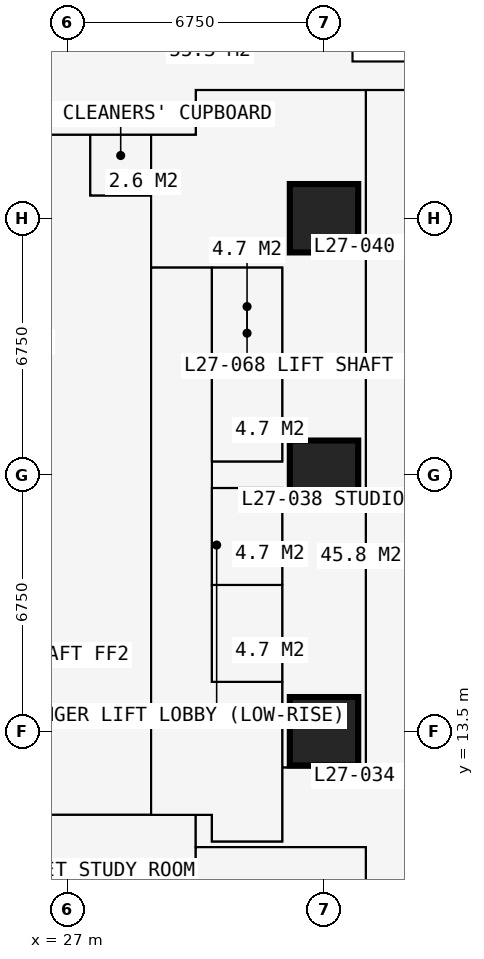
"""IFC4 building model, lengths in metres.
Left out: names, types, materials, properties, quantities, classifications, styles, units other than length and angle.
Written with IfcOpenShell. Run it as: python <this file> out.ifc"""

import sys

from ifc_helpers import new_model, si_unit, direction, frame, frame_2d, origin, origin_2d, place, context, subcontext, project, spatial, rectangle, extrude, element, fill, save


model = new_model("IFC4")
c1 = context("Model", 3, precision=1e-05, world=origin(), true_north=direction((0.0, 1.0)))
c2 = subcontext(c1, "Body", "Model", "MODEL_VIEW")
j1 = project(units=[si_unit("LENGTHUNIT", "METRE"), si_unit("PLANEANGLEUNIT", "RADIAN")], contexts=[c1])
p1 = place(None, origin())
s1 = spatial("IfcSite", under=j1, at=p1, CompositionType="ELEMENT")
p2 = place(p1, origin())
s2 = spatial("IfcBuilding", under=s1, at=p2, CompositionType="ELEMENT")
p3 = place(p2, frame((0.0, 0.0, 101.7)))
s3 = spatial("IfcBuildingStorey", under=s2, at=p3, CompositionType="ELEMENT", Elevation=101.7)
for number, where, z_axis, x_axis in (
    (1, (33.75, 13.5, 0.0), (0.0, 0.0, 1.0), (1.0, 0.0, 0.0)),
    (2, (33.75, 20.25, 0.0), (0.0, 0.0, 1.0), (1.0, 0.0, 0.0)),
    (3, (33.75, 27.0, 0.0), (0.0, 0.0, 1.0), (1.0, 0.0, 0.0)),
):
    element("IfcColumn", number, at=place(p3, frame(where, z_axis=z_axis, x_axis=x_axis)), inside=s3, PredefinedType="COLUMN", context=c2, shape_type="SweptSolid", body=[
        extrude(rectangle(XDim=1.8, YDim=1.8, at=origin_2d()), origin(), (0.0, 0.0, 1.0), 3.6),
    ])
p4 = place(p3, frame((12.9, 13.5, 0.0), z_axis=(0.0, 0.0, 1.0), x_axis=(1.0, 0.0, 0.0)))
e4 = element("IfcWall", 4, at=p4, inside=s3, PredefinedType="SHEAR", context=c2, shape_type="SweptSolid", body=[
    extrude(rectangle(XDim=14.7, YDim=1.2, at=frame_2d((7.35, 0.0))), origin(), (0.0, 0.0, 1.0), 3.6),
])
p5 = place(p3, frame((27.0, 14.1, 0.0), z_axis=(0.0, 0.0, 1.0), x_axis=(0.0, 1.0, 0.0)))
e5 = element("IfcWall", 5, at=p5, inside=s3, PredefinedType="SHEAR", context=c2, shape_type="SweptSolid", body=[
    extrude(rectangle(XDim=12.3, YDim=1.2, at=frame_2d((6.15, 0.0))), origin(), (0.0, 0.0, 1.0), 3.6),
])
p6 = place(p5, frame((3.65, 0.0, 0.0)))
e6 = element("IfcOpeningElement", 6, at=p6, cuts=e5, PredefinedType="OPENING", context=c2, shape_type="SweptSolid", body=[
    extrude(rectangle(XDim=1.2, YDim=2.2, at=frame_2d((0.6, 1.1))), frame((0.0, 0.61, 0.0), z_axis=(0.0, -1.0, 0.0), x_axis=(1.0, 0.0, 0.0)), (0.0, 0.0, 1.0), 1.22),
])
p7 = place(p3, frame((27.6, 27.0, 0.0), z_axis=(0.0, 0.0, 1.0), x_axis=(-1.0, 0.0, 0.0)))
e7 = element("IfcWall", 7, at=p7, inside=s3, PredefinedType="SHEAR", context=c2, shape_type="SweptSolid", body=[
    extrude(rectangle(XDim=14.7, YDim=1.2, at=frame_2d((7.35, 0.0))), origin(), (0.0, 0.0, 1.0), 3.6),
])
p8 = place(p7, frame((5.225, 0.0, 0.0)))
e8 = element("IfcOpeningElement", 8, at=p8, cuts=e7, PredefinedType="OPENING", context=c2, shape_type="SweptSolid", body=[
    extrude(rectangle(XDim=0.9, YDim=2.2, at=frame_2d((0.45, 1.1))), frame((0.0, 0.61, 0.0), z_axis=(0.0, -1.0, 0.0), x_axis=(1.0, 0.0, 0.0)), (0.0, 0.0, 1.0), 1.22),
])
p9 = place(p7, frame((8.2, 0.0, 0.0)))
e9 = element("IfcOpeningElement", 9, at=p9, cuts=e7, PredefinedType="OPENING", context=c2, shape_type="SweptSolid", body=[
    extrude(rectangle(XDim=1.0, YDim=2.2, at=frame_2d((0.5, 1.1))), frame((0.0, 0.61, 0.0), z_axis=(0.0, -1.0, 0.0), x_axis=(1.0, 0.0, 0.0)), (0.0, 0.0, 1.0), 1.22),
])
p10 = place(p3, frame((37.875, 31.125, 0.0), z_axis=(0.0, 0.0, 1.0), x_axis=(-1.0, 0.0, 0.0)))
e10 = element("IfcWall", 10, at=p10, inside=s3, PredefinedType="SOLIDWALL", context=c2, shape_type="SweptSolid", body=[
    extrude(rectangle(XDim=3.375, YDim=0.3, at=frame_2d((1.688, 0.0))), origin(), (0.0, 0.0, 1.0), 3.375),
])
p11 = place(p10, frame((0.788, 0.0, 0.6)))
e11 = element("IfcOpeningElement", 11, at=p11, cuts=e10, PredefinedType="OPENING", context=c2, shape_type="SweptSolid", body=[
    extrude(rectangle(XDim=1.8, YDim=2.1, at=frame_2d((0.9, 1.05))), frame((0.0, 0.16, 0.0), z_axis=(0.0, -1.0, 0.0), x_axis=(1.0, 0.0, 0.0)), (0.0, 0.0, 1.0), 0.32),
])
p12 = place(p3, frame((34.5, 31.125, 0.0), z_axis=(0.0, 0.0, 1.0), x_axis=(0.0, 1.0, 0.0)))
e12 = element("IfcWall", 12, at=p12, inside=s3, PredefinedType="SOLIDWALL", context=c2, shape_type="SweptSolid", body=[
    extrude(rectangle(XDim=3.375, YDim=0.3, at=frame_2d((1.688, 0.0))), origin(), (0.0, 0.0, 1.0), 3.375),
])
p13 = place(p12, frame((0.343, 0.0, 0.9)))
e13 = element("IfcOpeningElement", 13, at=p13, cuts=e12, PredefinedType="OPENING", context=c2, shape_type="SweptSolid", body=[
    extrude(rectangle(XDim=1.2, YDim=1.8, at=frame_2d((0.6, 0.9))), frame((0.0, 0.16, 0.0), z_axis=(0.0, -1.0, 0.0), x_axis=(1.0, 0.0, 0.0)), (0.0, 0.0, 1.0), 0.32),
])
p14 = place(p3, frame((10.125, 11.3, 0.0), z_axis=(0.0, 0.0, 1.0), x_axis=(1.0, 0.0, 0.0)))
e14 = element("IfcWall", 14, at=p14, inside=s3, PredefinedType="PARTITIONING", context=c2, shape_type="SweptSolid", body=[
    extrude(rectangle(XDim=20.675, YDim=0.15, at=frame_2d((10.337, 0.0))), origin(), (0.0, 0.0, 1.0), 3.375),
])
p15 = place(p14, frame((8.375, 0.0, 0.0)))
e15 = element("IfcOpeningElement", 15, at=p15, cuts=e14, PredefinedType="OPENING", context=c2, shape_type="SweptSolid", body=[
    extrude(rectangle(XDim=1.0, YDim=2.2, at=frame_2d((0.5, 1.1))), frame((0.0, 0.085, 0.0), z_axis=(0.0, -1.0, 0.0), x_axis=(1.0, 0.0, 0.0)), (0.0, 0.0, 1.0), 0.17),
])
p16 = place(p14, frame((10.975, 0.0, 0.0)))
e16 = element("IfcOpeningElement", 16, at=p16, cuts=e14, PredefinedType="OPENING", context=c2, shape_type="SweptSolid", body=[
    extrude(rectangle(XDim=1.0, YDim=2.2, at=frame_2d((0.5, 1.1))), frame((0.0, 0.085, 0.0), z_axis=(0.0, -1.0, 0.0), x_axis=(1.0, 0.0, 0.0)), (0.0, 0.0, 1.0), 0.17),
])
p17 = place(p14, frame((3.925, 0.0, 0.0)))
e17 = element("IfcOpeningElement", 17, at=p17, cuts=e14, PredefinedType="OPENING", context=c2, shape_type="SweptSolid", body=[
    extrude(rectangle(XDim=0.95, YDim=2.2, at=frame_2d((0.475, 1.1))), frame((0.0, 0.085, 0.0), z_axis=(0.0, -1.0, 0.0), x_axis=(1.0, 0.0, 0.0)), (0.0, 0.0, 1.0), 0.17),
])
p18 = place(p3, frame((11.3, 29.2, 0.0), z_axis=(0.0, 0.0, 1.0), x_axis=(1.0, 0.0, 0.0)))
e18 = element("IfcWall", 18, at=p18, inside=s3, PredefinedType="PARTITIONING", context=c2, shape_type="SweptSolid", body=[
    extrude(rectangle(XDim=19.075, YDim=0.15, at=frame_2d((9.538, 0.0))), origin(), (0.0, 0.0, 1.0), 3.375),
])
p19 = place(p18, frame((5.825, 0.0, 0.0)))
e19 = element("IfcOpeningElement", 19, at=p19, cuts=e18, PredefinedType="OPENING", context=c2, shape_type="SweptSolid", body=[
    extrude(rectangle(XDim=0.95, YDim=2.2, at=frame_2d((0.475, 1.1))), frame((0.0, 0.085, 0.0), z_axis=(0.0, -1.0, 0.0), x_axis=(1.0, 0.0, 0.0)), (0.0, 0.0, 1.0), 0.17),
])
p20 = place(p18, frame((9.2, 0.0, 0.0)))
e20 = element("IfcOpeningElement", 20, at=p20, cuts=e18, PredefinedType="OPENING", context=c2, shape_type="SweptSolid", body=[
    extrude(rectangle(XDim=0.95, YDim=2.2, at=frame_2d((0.475, 1.1))), frame((0.0, 0.085, 0.0), z_axis=(0.0, -1.0, 0.0), x_axis=(1.0, 0.0, 0.0)), (0.0, 0.0, 1.0), 0.17),
])
p21 = place(p18, frame((0.6, 0.0, 0.0)))
e21 = element("IfcOpeningElement", 21, at=p21, cuts=e18, PredefinedType="OPENING", context=c2, shape_type="SweptSolid", body=[
    extrude(rectangle(XDim=1.0, YDim=2.2, at=frame_2d((0.5, 1.1))), frame((0.0, 0.085, 0.0), z_axis=(0.0, -1.0, 0.0), x_axis=(1.0, 0.0, 0.0)), (0.0, 0.0, 1.0), 0.17),
])
p22 = place(p3, frame((27.6, 27.6, 0.0), z_axis=(0.0, 0.0, 1.0), x_axis=(0.0, 1.0, 0.0)))
e22 = element("IfcWall", 22, at=p22, inside=s3, PredefinedType="PARTITIONING", context=c2, shape_type="SweptSolid", body=[
    extrude(rectangle(XDim=1.6, YDim=0.15, at=frame_2d((0.8, 0.0))), origin(), (0.0, 0.0, 1.0), 3.375),
])
p23 = place(p22, frame((0.3, 0.0, 0.0)))
e23 = element("IfcOpeningElement", 23, at=p23, cuts=e22, PredefinedType="OPENING", context=c2, shape_type="SweptSolid", body=[
    extrude(rectangle(XDim=0.95, YDim=2.2, at=frame_2d((0.475, 1.1))), frame((0.0, 0.085, 0.0), z_axis=(0.0, -1.0, 0.0), x_axis=(1.0, 0.0, 0.0)), (0.0, 0.0, 1.0), 0.17),
])
p24 = place(p3, frame((27.6, 27.6, 0.0), z_axis=(0.0, 0.0, 1.0), x_axis=(1.0, 0.0, 0.0)))
e24 = element("IfcWall", 24, at=p24, inside=s3, PredefinedType="PARTITIONING", context=c2, shape_type="SweptSolid", body=[
    extrude(rectangle(XDim=1.6, YDim=0.15, at=frame_2d((0.8, 0.0))), origin(), (0.0, 0.0, 1.0), 2.806),
])
p25 = place(p3, frame((29.2, 11.3, 0.0), z_axis=(0.0, 0.0, 1.0), x_axis=(0.0, 1.0, 0.0)))
e25 = element("IfcWall", 25, at=p25, inside=s3, PredefinedType="PARTITIONING", context=c2, shape_type="SweptSolid", body=[
    extrude(rectangle(XDim=17.9, YDim=0.2, at=frame_2d((8.95, 0.0))), origin(), (0.0, 0.0, 1.0), 3.375),
])
p26 = place(p25, frame((8.35, 0.0, 0.0)))
e26 = element("IfcOpeningElement", 26, at=p26, cuts=e25, PredefinedType="OPENING", context=c2, shape_type="SweptSolid", body=[
    extrude(rectangle(XDim=1.2, YDim=2.2, at=frame_2d((0.6, 1.1))), frame((0.0, 0.11, 0.0), z_axis=(0.0, -1.0, 0.0), x_axis=(1.0, 0.0, 0.0)), (0.0, 0.0, 1.0), 0.22),
])
p27 = place(p3, frame((29.2, 25.7, 0.0), z_axis=(0.0, 0.0, 1.0), x_axis=(1.0, 0.0, 0.0)))
e27 = element("IfcWall", 27, at=p27, inside=s3, PredefinedType="SHEAR", context=c2, shape_type="SweptSolid", body=[
    extrude(rectangle(XDim=3.45, YDim=0.1, at=frame_2d((1.725, 0.0))), origin(), (0.0, 0.0, 1.0), 3.375),
])
p28 = place(p3, frame((30.375, -0.734, 0.0), z_axis=(0.0, 0.0, 1.0), x_axis=(0.0, 1.0, 0.0)))
e28 = element("IfcWall", 28, at=p28, inside=s3, PredefinedType="PARTITIONING", context=c2, shape_type="SweptSolid", body=[
    extrude(rectangle(XDim=12.034, YDim=0.15, at=frame_2d((6.017, 0.0))), origin(), (0.0, 0.0, 1.0), 3.375),
])
p29 = place(p28, frame((5.134, 0.0, 0.0)))
e29 = element("IfcOpeningElement", 29, at=p29, cuts=e28, PredefinedType="OPENING", context=c2, shape_type="SweptSolid", body=[
    extrude(rectangle(XDim=1.0, YDim=2.2, at=frame_2d((0.5, 1.1))), frame((0.0, 0.085, 0.0), z_axis=(0.0, -1.0, 0.0), x_axis=(1.0, 0.0, 0.0)), (0.0, 0.0, 1.0), 0.17),
])
p30 = place(p3, frame((30.375, 10.45, 0.0), z_axis=(0.0, 0.0, 1.0), x_axis=(1.0, 0.0, 0.0)))
e30 = element("IfcWall", 30, at=p30, inside=s3, PredefinedType="PARTITIONING", context=c2, shape_type="SweptSolid", body=[
    extrude(rectangle(XDim=4.475, YDim=0.15, at=frame_2d((2.238, 0.0))), origin(), (0.0, 0.0, 1.0), 3.375),
])
p31 = place(p30, frame((2.35, 0.0, 0.0)))
e31 = element("IfcOpeningElement", 31, at=p31, cuts=e30, PredefinedType="OPENING", context=c2, shape_type="SweptSolid", body=[
    extrude(rectangle(XDim=0.95, YDim=2.2, at=frame_2d((0.475, 1.1))), frame((0.0, 0.085, 0.0), z_axis=(0.0, -1.0, 0.0), x_axis=(1.0, 0.0, 0.0)), (0.0, 0.0, 1.0), 0.17),
])
p32 = place(p3, frame((30.375, 29.2, 0.0), z_axis=(0.0, 0.0, 1.0), x_axis=(0.0, 1.0, 0.0)))
e32 = element("IfcWall", 32, at=p32, inside=s3, PredefinedType="PARTITIONING", context=c2, shape_type="SweptSolid", body=[
    extrude(rectangle(XDim=1.175, YDim=0.15, at=frame_2d((0.587, 0.0))), origin(), (0.0, 0.0, 1.0), 3.375),
])
p33 = place(p3, frame((30.375, 30.375, 0.0), z_axis=(0.0, 0.0, 1.0), x_axis=(1.0, 0.0, 0.0)))
e33 = element("IfcWall", 33, at=p33, inside=s3, PredefinedType="PARTITIONING", context=c2, shape_type="SweptSolid", body=[
    extrude(rectangle(XDim=7.35, YDim=0.15, at=frame_2d((3.675, 0.0))), origin(), (0.0, 0.0, 1.0), 2.877),
])
p34 = place(p33, frame((5.125, 0.0, 0.0)))
e34 = element("IfcOpeningElement", 34, at=p34, cuts=e33, PredefinedType="OPENING", context=c2, shape_type="SweptSolid", body=[
    extrude(rectangle(XDim=1.0, YDim=2.2, at=frame_2d((0.5, 1.1))), frame((0.0, 0.085, 0.0), z_axis=(0.0, -1.0, 0.0), x_axis=(1.0, 0.0, 0.0)), (0.0, 0.0, 1.0), 0.17),
])
p35 = place(p3, frame((30.8, 10.6, 0.0), z_axis=(0.0, 0.0, 1.0), x_axis=(0.0, 1.0, 0.0)))
e35 = element("IfcWall", 35, at=p35, inside=s3, PredefinedType="PARTITIONING", context=c2, shape_type="SweptSolid", body=[
    extrude(rectangle(XDim=0.7, YDim=0.15, at=frame_2d((0.35, 0.0))), origin(), (0.0, 0.0, 1.0), 3.375),
])
p36 = place(p3, frame((30.8, 10.6, 0.0), z_axis=(0.0, 0.0, 1.0), x_axis=(1.0, 0.0, 0.0)))
e36 = element("IfcWall", 36, at=p36, inside=s3, PredefinedType="PARTITIONING", context=c2, shape_type="SweptSolid", body=[
    extrude(rectangle(XDim=1.85, YDim=0.15, at=frame_2d((0.925, 0.0))), origin(), (0.0, 0.0, 1.0), 3.375),
])
p37 = place(p3, frame((30.8, 14.8, 0.0), z_axis=(0.0, 0.0, 1.0), x_axis=(0.0, 1.0, 0.0)))
e37 = element("IfcWall", 37, at=p37, inside=s3, PredefinedType="PARTITIONING", context=c2, shape_type="SweptSolid", body=[
    extrude(rectangle(XDim=10.9, YDim=0.15, at=frame_2d((5.45, 0.0))), origin(), (0.0, 0.0, 1.0), 3.375),
])
p38 = place(p37, frame((0.75, 0.0, 0.0)))
e38 = element("IfcOpeningElement", 38, at=p38, cuts=e37, PredefinedType="OPENING", context=c2, shape_type="SweptSolid", body=[
    extrude(rectangle(XDim=1.1, YDim=2.2, at=frame_2d((0.55, 1.1))), frame((0.0, 0.085, 0.0), z_axis=(0.0, -1.0, 0.0), x_axis=(1.0, 0.0, 0.0)), (0.0, 0.0, 1.0), 0.17),
])
p39 = place(p37, frame((3.25, 0.0, 0.0)))
e39 = element("IfcOpeningElement", 39, at=p39, cuts=e37, PredefinedType="OPENING", context=c2, shape_type="SweptSolid", body=[
    extrude(rectangle(XDim=1.1, YDim=2.2, at=frame_2d((0.55, 1.1))), frame((0.0, 0.085, 0.0), z_axis=(0.0, -1.0, 0.0), x_axis=(1.0, 0.0, 0.0)), (0.0, 0.0, 1.0), 0.17),
])
p40 = place(p37, frame((6.5, 0.0, 0.0)))
e40 = element("IfcOpeningElement", 40, at=p40, cuts=e37, PredefinedType="OPENING", context=c2, shape_type="SweptSolid", body=[
    extrude(rectangle(XDim=1.1, YDim=2.2, at=frame_2d((0.55, 1.1))), frame((0.0, 0.085, 0.0), z_axis=(0.0, -1.0, 0.0), x_axis=(1.0, 0.0, 0.0)), (0.0, 0.0, 1.0), 0.17),
])
p41 = place(p37, frame((9.05, 0.0, 0.0)))
e41 = element("IfcOpeningElement", 41, at=p41, cuts=e37, PredefinedType="OPENING", context=c2, shape_type="SweptSolid", body=[
    extrude(rectangle(XDim=1.1, YDim=2.2, at=frame_2d((0.55, 1.1))), frame((0.0, 0.085, 0.0), z_axis=(0.0, -1.0, 0.0), x_axis=(1.0, 0.0, 0.0)), (0.0, 0.0, 1.0), 0.17),
])
for number, where, z_axis, x_axis in (
    (42, (30.8, 14.8, 0.0), (0.0, 0.0, 1.0), (1.0, 0.0, 0.0)),
    (43, (30.8, 17.35, 0.0), (0.0, 0.0, 1.0), (1.0, 0.0, 0.0)),
    (44, (30.8, 19.9, 0.0), (0.0, 0.0, 1.0), (1.0, 0.0, 0.0)),
    (45, (30.8, 20.6, 0.0), (0.0, 0.0, 1.0), (1.0, 0.0, 0.0)),
    (46, (30.8, 23.15, 0.0), (0.0, 0.0, 1.0), (1.0, 0.0, 0.0)),
):
    element("IfcWall", number, at=place(p3, frame(where, z_axis=z_axis, x_axis=x_axis)), inside=s3, PredefinedType="SHEAR", context=c2, shape_type="SweptSolid", body=[
        extrude(rectangle(XDim=1.85, YDim=0.1, at=frame_2d((0.925, 0.0))), origin(), (0.0, 0.0, 1.0), 3.375),
    ])
p42 = place(p3, frame((32.65, 10.6, 0.0), z_axis=(0.0, 0.0, 1.0), x_axis=(0.0, 1.0, 0.0)))
e47 = element("IfcWall", 47, at=p42, inside=s3, PredefinedType="SHEAR", context=c2, shape_type="SweptSolid", body=[
    extrude(rectangle(XDim=9.3, YDim=0.1, at=frame_2d((4.65, 0.0))), origin(), (0.0, 0.0, 1.0), 3.375),
])
p43 = place(p42, frame((0.5, 0.0, 0.0)))
e48 = element("IfcOpeningElement", 48, at=p43, cuts=e47, PredefinedType="OPENING", context=c2, shape_type="SweptSolid", body=[
    extrude(rectangle(XDim=1.0, YDim=2.2, at=frame_2d((0.5, 1.1))), frame((0.0, 0.06, 0.0), z_axis=(0.0, -1.0, 0.0), x_axis=(1.0, 0.0, 0.0)), (0.0, 0.0, 1.0), 0.12),
])
p44 = place(p3, frame((32.65, 12.55, 0.0), z_axis=(0.0, 0.0, 1.0), x_axis=(1.0, 0.0, 0.0)))
e49 = element("IfcWall", 49, at=p44, inside=s3, PredefinedType="PARTITIONING", context=c2, shape_type="SweptSolid", body=[
    extrude(rectangle(XDim=2.2, YDim=0.15, at=frame_2d((1.1, 0.0))), origin(), (0.0, 0.0, 1.0), 3.375),
])
p45 = place(p3, frame((32.65, 20.6, 0.0), z_axis=(0.0, 0.0, 1.0), x_axis=(0.0, 1.0, 0.0)))
e50 = element("IfcWall", 50, at=p45, inside=s3, PredefinedType="PARTITIONING", context=c2, shape_type="SweptSolid", body=[
    extrude(rectangle(XDim=5.1, YDim=0.15, at=frame_2d((2.55, 0.0))), origin(), (0.0, 0.0, 1.0), 3.375),
])
p46 = place(p3, frame((34.85, 6.75, 0.0), z_axis=(0.0, 0.0, 1.0), x_axis=(0.0, 1.0, 0.0)))
e51 = element("IfcWall", 51, at=p46, inside=s3, PredefinedType="PARTITIONING", context=c2, shape_type="SweptSolid", body=[
    extrude(rectangle(XDim=3.7, YDim=0.15, at=frame_2d((1.85, 0.0))), origin(), (0.0, 0.0, 1.0), 3.375),
])
p47 = place(p3, frame((34.85, 12.55, 0.0), z_axis=(0.0, 0.0, 1.0), x_axis=(0.0, 1.0, 0.0)))
e52 = element("IfcWall", 52, at=p47, inside=s3, PredefinedType="PARTITIONING", context=c2, shape_type="SweptSolid", body=[
    extrude(rectangle(XDim=17.825, YDim=0.15, at=frame_2d((8.913, 0.0))), origin(), (0.0, 0.0, 1.0), 3.375),
])
p48 = place(p47, frame((8.6, 0.0, 0.0)))
e53 = element("IfcOpeningElement", 53, at=p48, cuts=e52, PredefinedType="OPENING", context=c2, shape_type="SweptSolid", body=[
    extrude(rectangle(XDim=0.95, YDim=2.2, at=frame_2d((0.475, 1.1))), frame((0.0, 0.085, 0.0), z_axis=(0.0, -1.0, 0.0), x_axis=(1.0, 0.0, 0.0)), (0.0, 0.0, 1.0), 0.17),
])
p49 = place(p11, origin())
e54 = element("IfcWindow", 54, at=p49, inside=s3, PartitioningType="SINGLE_PANEL", PredefinedType="WINDOW", context=c2, shape_type="SweptSolid", body=[
    extrude(rectangle(XDim=1.8, YDim=2.1, at=frame_2d((0.9, 1.05))), frame((0.0, 0.03, 0.0), z_axis=(0.0, -1.0, 0.0), x_axis=(1.0, 0.0, 0.0)), (0.0, 0.0, 1.0), 0.06),
])
fill(e11, e54)
p50 = place(p6, origin())
e55 = element("IfcDoor", 55, at=p50, inside=s3, OperationType="DOUBLE_DOOR_SINGLE_SWING", PredefinedType="DOOR", context=c2, shape_type="SweptSolid", body=[
    extrude(rectangle(XDim=1.2, YDim=2.2, at=frame_2d((0.6, 1.1))), frame((0.0, 0.025, 0.0), z_axis=(0.0, -1.0, 0.0), x_axis=(1.0, 0.0, 0.0)), (0.0, 0.0, 1.0), 0.05),
])
fill(e6, e55)
p51 = place(p23, origin())
e56 = element("IfcDoor", 56, at=p51, inside=s3, OperationType="SINGLE_SWING_LEFT", PredefinedType="DOOR", context=c2, shape_type="SweptSolid", body=[
    extrude(rectangle(XDim=0.95, YDim=2.2, at=frame_2d((0.475, 1.1))), frame((0.0, 0.025, 0.0), z_axis=(0.0, -1.0, 0.0), x_axis=(1.0, 0.0, 0.0)), (0.0, 0.0, 1.0), 0.05),
])
fill(e23, e56)
p52 = place(p43, origin())
e57 = element("IfcDoor", 57, at=p52, inside=s3, OperationType="SINGLE_SWING_LEFT", PredefinedType="DOOR", context=c2, shape_type="SweptSolid", body=[
    extrude(rectangle(XDim=1.0, YDim=2.2, at=frame_2d((0.5, 1.1))), frame((0.0, 0.025, 0.0), z_axis=(0.0, -1.0, 0.0), x_axis=(1.0, 0.0, 0.0)), (0.0, 0.0, 1.0), 0.05),
])
fill(e48, e57)
p53 = place(p48, origin())
e58 = element("IfcDoor", 58, at=p53, inside=s3, OperationType="SINGLE_SWING_LEFT", PredefinedType="DOOR", context=c2, shape_type="SweptSolid", body=[
    extrude(rectangle(XDim=0.95, YDim=2.2, at=frame_2d((0.475, 1.1))), frame((0.0, 0.025, 0.0), z_axis=(0.0, -1.0, 0.0), x_axis=(1.0, 0.0, 0.0)), (0.0, 0.0, 1.0), 0.05),
])
fill(e53, e58)
p54 = place(p31, origin())
e59 = element("IfcDoor", 59, at=p54, inside=s3, OperationType="SINGLE_SWING_LEFT", PredefinedType="DOOR", context=c2, shape_type="SweptSolid", body=[
    extrude(rectangle(XDim=0.95, YDim=2.2, at=frame_2d((0.475, 1.1))), frame((0.0, 0.025, 0.0), z_axis=(0.0, -1.0, 0.0), x_axis=(1.0, 0.0, 0.0)), (0.0, 0.0, 1.0), 0.05),
])
fill(e31, e59)
p55 = place(p34, origin())
e60 = element("IfcDoor", 60, at=p55, inside=s3, OperationType="SINGLE_SWING_LEFT", PredefinedType="DOOR", context=c2, shape_type="SweptSolid", body=[
    extrude(rectangle(XDim=1.0, YDim=2.2, at=frame_2d((0.5, 1.1))), frame((0.0, 0.025, 0.0), z_axis=(0.0, -1.0, 0.0), x_axis=(1.0, 0.0, 0.0)), (0.0, 0.0, 1.0), 0.05),
])
fill(e34, e60)
p56 = place(p38, origin())
e61 = element("IfcDoor", 61, at=p56, inside=s3, OperationType="DOUBLE_DOOR_SLIDING", PredefinedType="DOOR", context=c2, shape_type="SweptSolid", body=[
    extrude(rectangle(XDim=1.1, YDim=2.2, at=frame_2d((0.55, 1.1))), frame((0.0, 0.025, 0.0), z_axis=(0.0, -1.0, 0.0), x_axis=(1.0, 0.0, 0.0)), (0.0, 0.0, 1.0), 0.05),
])
fill(e38, e61)
p57 = place(p39, origin())
e62 = element("IfcDoor", 62, at=p57, inside=s3, OperationType="DOUBLE_DOOR_SLIDING", PredefinedType="DOOR", context=c2, shape_type="SweptSolid", body=[
    extrude(rectangle(XDim=1.1, YDim=2.2, at=frame_2d((0.55, 1.1))), frame((0.0, 0.025, 0.0), z_axis=(0.0, -1.0, 0.0), x_axis=(1.0, 0.0, 0.0)), (0.0, 0.0, 1.0), 0.05),
])
fill(e39, e62)
p58 = place(p40, origin())
e63 = element("IfcDoor", 63, at=p58, inside=s3, OperationType="DOUBLE_DOOR_SLIDING", PredefinedType="DOOR", context=c2, shape_type="SweptSolid", body=[
    extrude(rectangle(XDim=1.1, YDim=2.2, at=frame_2d((0.55, 1.1))), frame((0.0, 0.025, 0.0), z_axis=(0.0, -1.0, 0.0), x_axis=(1.0, 0.0, 0.0)), (0.0, 0.0, 1.0), 0.05),
])
fill(e40, e63)
p59 = place(p41, origin())
e64 = element("IfcDoor", 64, at=p59, inside=s3, OperationType="DOUBLE_DOOR_SLIDING", PredefinedType="DOOR", context=c2, shape_type="SweptSolid", body=[
    extrude(rectangle(XDim=1.1, YDim=2.2, at=frame_2d((0.55, 1.1))), frame((0.0, 0.025, 0.0), z_axis=(0.0, -1.0, 0.0), x_axis=(1.0, 0.0, 0.0)), (0.0, 0.0, 1.0), 0.05),
])
fill(e41, e64)
p60 = place(p26, origin())
e65 = element("IfcDoor", 65, at=p60, inside=s3, OperationType="DOUBLE_DOOR_SINGLE_SWING", PredefinedType="DOOR", context=c2, shape_type="SweptSolid", body=[
    extrude(rectangle(XDim=1.2, YDim=2.2, at=frame_2d((0.6, 1.1))), frame((0.0, 0.025, 0.0), z_axis=(0.0, -1.0, 0.0), x_axis=(1.0, 0.0, 0.0)), (0.0, 0.0, 1.0), 0.05),
])
fill(e26, e65)
save(model, sys.argv[1])
